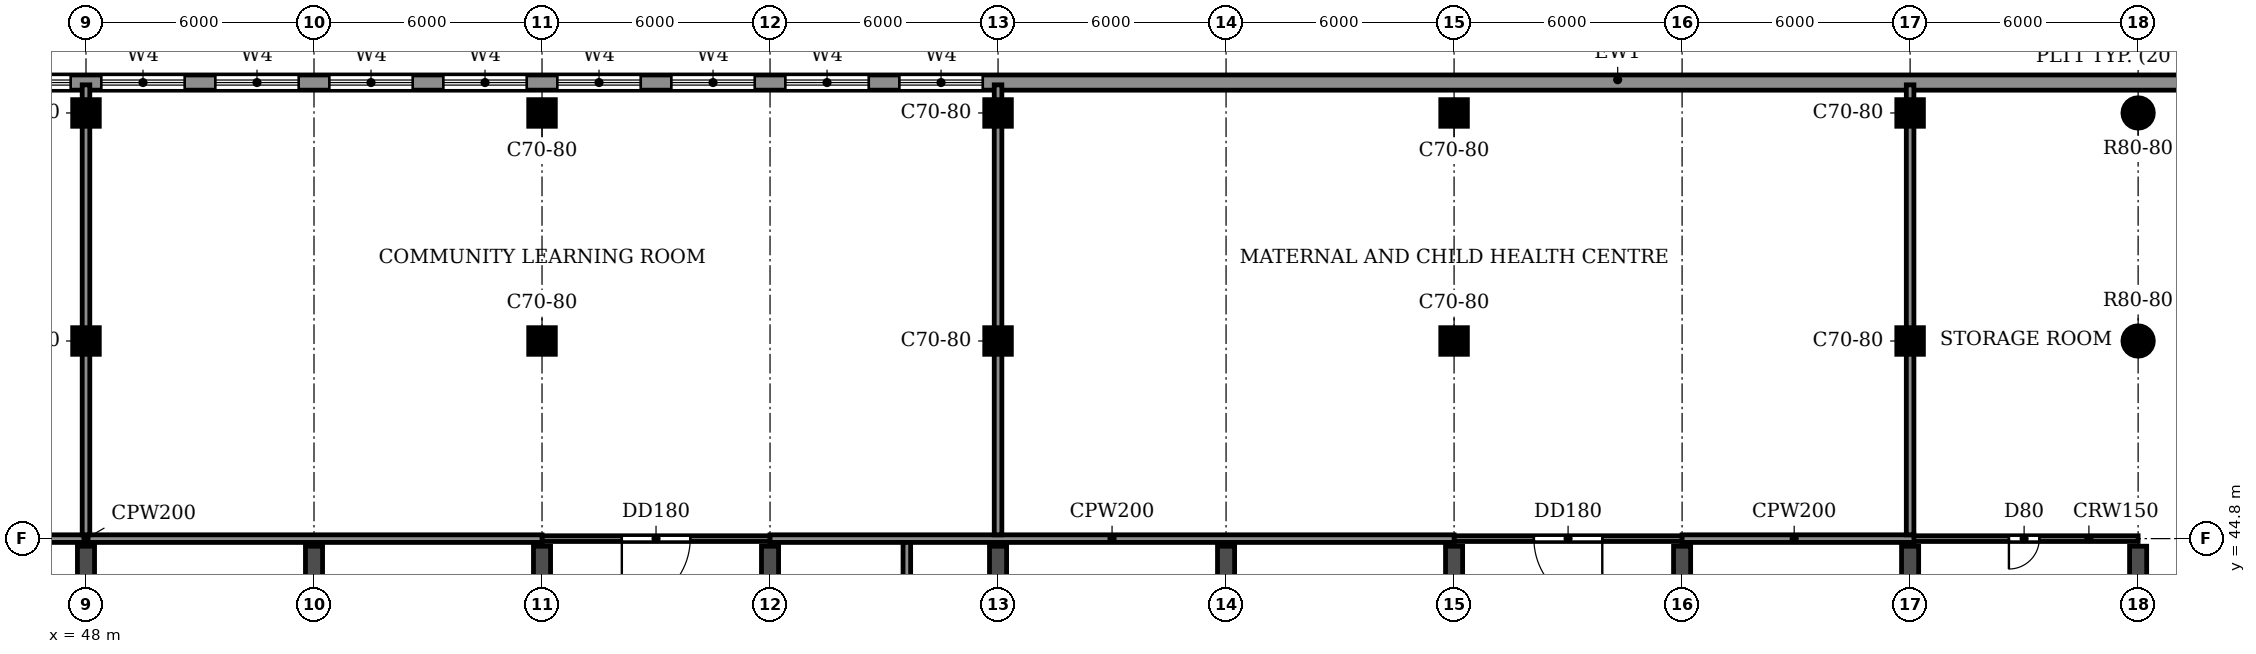
"""IFC4 building model, lengths in metres.
Left out: names, types, materials, properties, quantities, classifications, styles, units other than length and angle.
Written with IfcOpenShell. Run it as: python <this file> out.ifc"""

import sys

from ifc_helpers import new_model, si_unit, direction, frame, frame_2d, origin, origin_2d, place, context, subcontext, project, spatial, rectangle, circle, extrude, source, transform, mapped, element, fill, save


model = new_model("IFC4")
c1 = context("Model", 3, precision=1e-05, world=origin(), true_north=direction((0.0, 1.0)))
c2 = subcontext(c1, "Body", "Model", "MODEL_VIEW")
j1 = project(units=[si_unit("LENGTHUNIT", "METRE"), si_unit("PLANEANGLEUNIT", "RADIAN")], contexts=[c1])
p1 = place(None, origin())
s1 = spatial("IfcSite", under=j1, at=p1, CompositionType="ELEMENT")
p2 = place(p1, origin())
s2 = spatial("IfcBuilding", under=s1, at=p2, CompositionType="ELEMENT")
p3 = place(p2, frame((0.0, 0.0, 15.0)))
s3 = spatial("IfcBuildingStorey", under=s2, at=p3, CompositionType="ELEMENT", Elevation=15.0)
for number, where, z_axis, x_axis in (
    (1, (48.0, 30.55, 0.0), (0.0, 0.0, 1.0), (0.0, 1.0, 0.0)),
    (2, (54.0, 30.55, 0.0), (0.0, 0.0, 1.0), (0.0, 1.0, 0.0)),
    (3, (60.0, 30.55, 0.0), (0.0, 0.0, 1.0), (0.0, 1.0, 0.0)),
    (4, (66.0, 30.55, 0.0), (0.0, 0.0, 1.0), (0.0, 1.0, 0.0)),
    (5, (72.0, 30.55, 0.0), (0.0, 0.0, 1.0), (0.0, 1.0, 0.0)),
    (6, (78.0, 30.55, 0.0), (0.0, 0.0, 1.0), (0.0, 1.0, 0.0)),
    (7, (84.0, 30.55, 0.0), (0.0, 0.0, 1.0), (0.0, 1.0, 0.0)),
    (8, (90.0, 30.55, 0.0), (0.0, 0.0, 1.0), (0.0, 1.0, 0.0)),
    (9, (96.0, 30.55, 0.0), (0.0, 0.0, 1.0), (0.0, 1.0, 0.0)),
    (10, (102.0, 30.55, 0.0), (0.0, 0.0, 1.0), (0.0, 1.0, 0.0)),
):
    element("IfcWall", number, at=place(p3, frame(where, z_axis=z_axis, x_axis=x_axis)), inside=s3, PredefinedType="SHEAR", context=c2, shape_type="SweptSolid", body=[
        extrude(rectangle(XDim=14.05, YDim=0.45, at=frame_2d((7.025, 0.0))), origin(), (0.0, 0.0, 1.0), 3.92),
    ])
m1 = source(origin(), c2, "Body", "SweptSolid", [
    extrude(rectangle(XDim=0.7, YDim=0.7, at=origin_2d()), origin(), (0.0, 0.0, 1.0), 3.92),
])
for number, where, z_axis, x_axis in (
    (11, (48.0, 56.0, 0.0), (0.0, 0.0, 1.0), (1.0, 0.0, 0.0)),
    (12, (60.0, 56.0, 0.0), (0.0, 0.0, 1.0), (1.0, 0.0, 0.0)),
    (13, (72.0, 56.0, 0.0), (0.0, 0.0, 1.0), (1.0, 0.0, 0.0)),
    (14, (84.0, 56.0, 0.0), (0.0, 0.0, 1.0), (1.0, 0.0, 0.0)),
    (15, (96.0, 56.0, 0.0), (0.0, 0.0, 1.0), (1.0, 0.0, 0.0)),
):
    element("IfcColumn", number, at=place(p3, frame(where, z_axis=z_axis, x_axis=x_axis)), inside=s3, PredefinedType="COLUMN", context=c2, shape_type="MappedRepresentation", body=[
        mapped(m1, transform((0.0, 0.0, 0.0))),
    ])
m2 = source(origin(), c2, "Body", "SweptSolid", [
    extrude(circle(Radius=0.4, at=origin_2d()), origin(), (0.0, 0.0, 1.0), 3.92),
])
p4 = place(p3, frame((102.0, 56.0, 0.0), z_axis=(0.0, 0.0, 1.0), x_axis=(1.0, 0.0, 0.0)))
e16 = element("IfcColumn", 16, at=p4, inside=s3, PredefinedType="COLUMN", context=c2, shape_type="MappedRepresentation", body=[
    mapped(m2, transform((0.0, 0.0, 0.0))),
])
for number, where, z_axis, x_axis in (
    (17, (48.0, 50.0, 0.0), (0.0, 0.0, 1.0), (1.0, 0.0, 0.0)),
    (18, (60.0, 50.0, 0.0), (0.0, 0.0, 1.0), (1.0, 0.0, 0.0)),
    (19, (72.0, 50.0, 0.0), (0.0, 0.0, 1.0), (1.0, 0.0, 0.0)),
    (20, (84.0, 50.0, 0.0), (0.0, 0.0, 1.0), (1.0, 0.0, 0.0)),
    (21, (96.0, 50.0, 0.0), (0.0, 0.0, 1.0), (1.0, 0.0, 0.0)),
):
    element("IfcColumn", number, at=place(p3, frame(where, z_axis=z_axis, x_axis=x_axis)), inside=s3, PredefinedType="COLUMN", context=c2, shape_type="MappedRepresentation", body=[
        mapped(m1, transform((0.0, 0.0, 0.0))),
    ])
p5 = place(p3, frame((102.0, 50.0, 0.0), z_axis=(0.0, 0.0, 1.0), x_axis=(1.0, 0.0, 0.0)))
e22 = element("IfcColumn", 22, at=p5, inside=s3, PredefinedType="COLUMN", context=c2, shape_type="MappedRepresentation", body=[
    mapped(m2, transform((0.0, 0.0, 0.0))),
])
p6 = place(p3, frame((105.0, 56.8, 0.0), z_axis=(0.0, 0.0, 1.0), x_axis=(-1.0, 0.0, 0.0)))
e23 = element("IfcWall", 23, at=p6, inside=s3, PredefinedType="STANDARD", context=c2, shape_type="SweptSolid", body=[
    extrude(rectangle(XDim=108.0, YDim=0.4, at=frame_2d((54.0, 0.0))), origin(), (0.0, 0.0, 1.0), 3.92),
])
p7 = place(p6, frame((102.4, 0.0, 0.9)))
e24 = element("IfcOpeningElement", 24, at=p7, cuts=e23, PredefinedType="OPENING", context=c2, shape_type="SweptSolid", body=[
    extrude(rectangle(XDim=2.2, YDim=2.7, at=frame_2d((1.1, 1.35))), frame((0.0, 0.21, 0.0), z_axis=(0.0, -1.0, 0.0), x_axis=(1.0, 0.0, 0.0)), (0.0, 0.0, 1.0), 0.42),
])
p8 = place(p6, frame((99.4, 0.0, 0.9)))
e25 = element("IfcOpeningElement", 25, at=p8, cuts=e23, PredefinedType="OPENING", context=c2, shape_type="SweptSolid", body=[
    extrude(rectangle(XDim=2.2, YDim=2.7, at=frame_2d((1.1, 1.35))), frame((0.0, 0.21, 0.0), z_axis=(0.0, -1.0, 0.0), x_axis=(1.0, 0.0, 0.0)), (0.0, 0.0, 1.0), 0.42),
])
p9 = place(p6, frame((90.4, 0.0, 0.9)))
e26 = element("IfcOpeningElement", 26, at=p9, cuts=e23, PredefinedType="OPENING", context=c2, shape_type="SweptSolid", body=[
    extrude(rectangle(XDim=2.2, YDim=2.7, at=frame_2d((1.1, 1.35))), frame((0.0, 0.21, 0.0), z_axis=(0.0, -1.0, 0.0), x_axis=(1.0, 0.0, 0.0)), (0.0, 0.0, 1.0), 0.42),
])
p10 = place(p6, frame((87.4, 0.0, 0.9)))
e27 = element("IfcOpeningElement", 27, at=p10, cuts=e23, PredefinedType="OPENING", context=c2, shape_type="SweptSolid", body=[
    extrude(rectangle(XDim=2.2, YDim=2.7, at=frame_2d((1.1, 1.35))), frame((0.0, 0.21, 0.0), z_axis=(0.0, -1.0, 0.0), x_axis=(1.0, 0.0, 0.0)), (0.0, 0.0, 1.0), 0.42),
])
p11 = place(p6, frame((84.4, 0.0, 0.9)))
e28 = element("IfcOpeningElement", 28, at=p11, cuts=e23, PredefinedType="OPENING", context=c2, shape_type="SweptSolid", body=[
    extrude(rectangle(XDim=2.2, YDim=2.7, at=frame_2d((1.1, 1.35))), frame((0.0, 0.21, 0.0), z_axis=(0.0, -1.0, 0.0), x_axis=(1.0, 0.0, 0.0)), (0.0, 0.0, 1.0), 0.42),
])
p12 = place(p6, frame((81.4, 0.0, 0.9)))
e29 = element("IfcOpeningElement", 29, at=p12, cuts=e23, PredefinedType="OPENING", context=c2, shape_type="SweptSolid", body=[
    extrude(rectangle(XDim=2.2, YDim=2.7, at=frame_2d((1.1, 1.35))), frame((0.0, 0.21, 0.0), z_axis=(0.0, -1.0, 0.0), x_axis=(1.0, 0.0, 0.0)), (0.0, 0.0, 1.0), 0.42),
])
p13 = place(p6, frame((78.4, 0.0, 0.9)))
e30 = element("IfcOpeningElement", 30, at=p13, cuts=e23, PredefinedType="OPENING", context=c2, shape_type="SweptSolid", body=[
    extrude(rectangle(XDim=2.2, YDim=2.7, at=frame_2d((1.1, 1.35))), frame((0.0, 0.21, 0.0), z_axis=(0.0, -1.0, 0.0), x_axis=(1.0, 0.0, 0.0)), (0.0, 0.0, 1.0), 0.42),
])
p14 = place(p6, frame((75.4, 0.0, 0.9)))
e31 = element("IfcOpeningElement", 31, at=p14, cuts=e23, PredefinedType="OPENING", context=c2, shape_type="SweptSolid", body=[
    extrude(rectangle(XDim=2.2, YDim=2.7, at=frame_2d((1.1, 1.35))), frame((0.0, 0.21, 0.0), z_axis=(0.0, -1.0, 0.0), x_axis=(1.0, 0.0, 0.0)), (0.0, 0.0, 1.0), 0.42),
])
p15 = place(p6, frame((66.4, 0.0, 0.9)))
e32 = element("IfcOpeningElement", 32, at=p15, cuts=e23, PredefinedType="OPENING", context=c2, shape_type="SweptSolid", body=[
    extrude(rectangle(XDim=2.2, YDim=2.7, at=frame_2d((1.1, 1.35))), frame((0.0, 0.21, 0.0), z_axis=(0.0, -1.0, 0.0), x_axis=(1.0, 0.0, 0.0)), (0.0, 0.0, 1.0), 0.42),
])
p16 = place(p6, frame((63.4, 0.0, 0.9)))
e33 = element("IfcOpeningElement", 33, at=p16, cuts=e23, PredefinedType="OPENING", context=c2, shape_type="SweptSolid", body=[
    extrude(rectangle(XDim=2.2, YDim=2.7, at=frame_2d((1.1, 1.35))), frame((0.0, 0.21, 0.0), z_axis=(0.0, -1.0, 0.0), x_axis=(1.0, 0.0, 0.0)), (0.0, 0.0, 1.0), 0.42),
])
p17 = place(p6, frame((60.4, 0.0, 0.9)))
e34 = element("IfcOpeningElement", 34, at=p17, cuts=e23, PredefinedType="OPENING", context=c2, shape_type="SweptSolid", body=[
    extrude(rectangle(XDim=2.2, YDim=2.7, at=frame_2d((1.1, 1.35))), frame((0.0, 0.21, 0.0), z_axis=(0.0, -1.0, 0.0), x_axis=(1.0, 0.0, 0.0)), (0.0, 0.0, 1.0), 0.42),
])
p18 = place(p6, frame((57.4, 0.0, 0.9)))
e35 = element("IfcOpeningElement", 35, at=p18, cuts=e23, PredefinedType="OPENING", context=c2, shape_type="SweptSolid", body=[
    extrude(rectangle(XDim=2.2, YDim=2.7, at=frame_2d((1.1, 1.35))), frame((0.0, 0.21, 0.0), z_axis=(0.0, -1.0, 0.0), x_axis=(1.0, 0.0, 0.0)), (0.0, 0.0, 1.0), 0.42),
])
p19 = place(p6, frame((54.4, 0.0, 0.9)))
e36 = element("IfcOpeningElement", 36, at=p19, cuts=e23, PredefinedType="OPENING", context=c2, shape_type="SweptSolid", body=[
    extrude(rectangle(XDim=2.2, YDim=2.7, at=frame_2d((1.1, 1.35))), frame((0.0, 0.21, 0.0), z_axis=(0.0, -1.0, 0.0), x_axis=(1.0, 0.0, 0.0)), (0.0, 0.0, 1.0), 0.42),
])
p20 = place(p6, frame((51.4, 0.0, 0.9)))
e37 = element("IfcOpeningElement", 37, at=p20, cuts=e23, PredefinedType="OPENING", context=c2, shape_type="SweptSolid", body=[
    extrude(rectangle(XDim=2.2, YDim=2.7, at=frame_2d((1.1, 1.35))), frame((0.0, 0.21, 0.0), z_axis=(0.0, -1.0, 0.0), x_axis=(1.0, 0.0, 0.0)), (0.0, 0.0, 1.0), 0.42),
])
p21 = place(p6, frame((48.4, 0.0, 0.9)))
e38 = element("IfcOpeningElement", 38, at=p21, cuts=e23, PredefinedType="OPENING", context=c2, shape_type="SweptSolid", body=[
    extrude(rectangle(XDim=2.2, YDim=2.7, at=frame_2d((1.1, 1.35))), frame((0.0, 0.21, 0.0), z_axis=(0.0, -1.0, 0.0), x_axis=(1.0, 0.0, 0.0)), (0.0, 0.0, 1.0), 0.42),
])
p22 = place(p6, frame((45.4, 0.0, 0.9)))
e39 = element("IfcOpeningElement", 39, at=p22, cuts=e23, PredefinedType="OPENING", context=c2, shape_type="SweptSolid", body=[
    extrude(rectangle(XDim=2.2, YDim=2.7, at=frame_2d((1.1, 1.35))), frame((0.0, 0.21, 0.0), z_axis=(0.0, -1.0, 0.0), x_axis=(1.0, 0.0, 0.0)), (0.0, 0.0, 1.0), 0.42),
])
p23 = place(p6, frame((42.4, 0.0, 0.9)))
e40 = element("IfcOpeningElement", 40, at=p23, cuts=e23, PredefinedType="OPENING", context=c2, shape_type="SweptSolid", body=[
    extrude(rectangle(XDim=2.2, YDim=2.7, at=frame_2d((1.1, 1.35))), frame((0.0, 0.21, 0.0), z_axis=(0.0, -1.0, 0.0), x_axis=(1.0, 0.0, 0.0)), (0.0, 0.0, 1.0), 0.42),
])
p24 = place(p6, frame((39.4, 0.0, 0.9)))
e41 = element("IfcOpeningElement", 41, at=p24, cuts=e23, PredefinedType="OPENING", context=c2, shape_type="SweptSolid", body=[
    extrude(rectangle(XDim=2.2, YDim=2.7, at=frame_2d((1.1, 1.35))), frame((0.0, 0.21, 0.0), z_axis=(0.0, -1.0, 0.0), x_axis=(1.0, 0.0, 0.0)), (0.0, 0.0, 1.0), 0.42),
])
p25 = place(p6, frame((36.4, 0.0, 0.9)))
e42 = element("IfcOpeningElement", 42, at=p25, cuts=e23, PredefinedType="OPENING", context=c2, shape_type="SweptSolid", body=[
    extrude(rectangle(XDim=2.2, YDim=2.7, at=frame_2d((1.1, 1.35))), frame((0.0, 0.21, 0.0), z_axis=(0.0, -1.0, 0.0), x_axis=(1.0, 0.0, 0.0)), (0.0, 0.0, 1.0), 0.42),
])
p26 = place(p6, frame((33.4, 0.0, 0.9)))
e43 = element("IfcOpeningElement", 43, at=p26, cuts=e23, PredefinedType="OPENING", context=c2, shape_type="SweptSolid", body=[
    extrude(rectangle(XDim=2.2, YDim=2.7, at=frame_2d((1.1, 1.35))), frame((0.0, 0.21, 0.0), z_axis=(0.0, -1.0, 0.0), x_axis=(1.0, 0.0, 0.0)), (0.0, 0.0, 1.0), 0.42),
])
p27 = place(p6, frame((93.65, 0.0, 0.0)))
e44 = element("IfcOpeningElement", 44, at=p27, cuts=e23, PredefinedType="OPENING", context=c2, shape_type="SweptSolid", body=[
    extrude(rectangle(XDim=2.0, YDim=2.4, at=frame_2d((1.0, 1.2))), frame((0.0, 0.21, 0.0), z_axis=(0.0, -1.0, 0.0), x_axis=(1.0, 0.0, 0.0)), (0.0, 0.0, 1.0), 0.42),
])
p28 = place(p6, frame((69.8, 0.0, 0.0)))
e45 = element("IfcOpeningElement", 45, at=p28, cuts=e23, PredefinedType="OPENING", context=c2, shape_type="SweptSolid", body=[
    extrude(rectangle(XDim=2.0, YDim=2.4, at=frame_2d((1.0, 1.2))), frame((0.0, 0.21, 0.0), z_axis=(0.0, -1.0, 0.0), x_axis=(1.0, 0.0, 0.0)), (0.0, 0.0, 1.0), 0.42),
])
p29 = place(p3, frame((60.0, 44.8, 0.0), z_axis=(0.0, 0.0, 1.0), x_axis=(1.0, 0.0, 0.0)))
e46 = element("IfcWall", 46, at=p29, inside=s3, PredefinedType="PARTITIONING", context=c2, shape_type="SweptSolid", body=[
    extrude(rectangle(XDim=6.0, YDim=0.15, at=frame_2d((3.0, 0.0))), origin(), (0.0, 0.0, 1.0), 3.92),
])
p30 = place(p29, frame((2.1, 0.0, 0.0)))
e47 = element("IfcOpeningElement", 47, at=p30, cuts=e46, PredefinedType="OPENING", context=c2, shape_type="SweptSolid", body=[
    extrude(rectangle(XDim=1.8, YDim=2.1, at=frame_2d((0.9, 1.05))), frame((0.0, 0.085, 0.0), z_axis=(0.0, -1.0, 0.0), x_axis=(1.0, 0.0, 0.0)), (0.0, 0.0, 1.0), 0.17),
])
p31 = place(p3, frame((84.0, 44.8, 0.0), z_axis=(0.0, 0.0, 1.0), x_axis=(1.0, 0.0, 0.0)))
e48 = element("IfcWall", 48, at=p31, inside=s3, PredefinedType="PARTITIONING", context=c2, shape_type="SweptSolid", body=[
    extrude(rectangle(XDim=6.0, YDim=0.15, at=frame_2d((3.0, 0.0))), origin(), (0.0, 0.0, 1.0), 3.92),
])
p32 = place(p31, frame((2.1, 0.0, 0.0)))
e49 = element("IfcOpeningElement", 49, at=p32, cuts=e48, PredefinedType="OPENING", context=c2, shape_type="SweptSolid", body=[
    extrude(rectangle(XDim=1.8, YDim=2.1, at=frame_2d((0.9, 1.05))), frame((0.0, 0.085, 0.0), z_axis=(0.0, -1.0, 0.0), x_axis=(1.0, 0.0, 0.0)), (0.0, 0.0, 1.0), 0.17),
])
p33 = place(p3, frame((95.9, 44.8, 0.0), z_axis=(0.0, 0.0, 1.0), x_axis=(1.0, 0.0, 0.0)))
e50 = element("IfcWall", 50, at=p33, inside=s3, PredefinedType="PARTITIONING", context=c2, shape_type="SweptSolid", body=[
    extrude(rectangle(XDim=6.1, YDim=0.15, at=frame_2d((3.05, 0.0))), origin(), (0.0, 0.0, 1.0), 3.92),
])
p34 = place(p33, frame((2.7, 0.0, 0.0)))
e51 = element("IfcOpeningElement", 51, at=p34, cuts=e50, PredefinedType="OPENING", context=c2, shape_type="SweptSolid", body=[
    extrude(rectangle(XDim=0.8, YDim=2.1, at=frame_2d((0.4, 1.05))), frame((0.0, 0.085, 0.0), z_axis=(0.0, -1.0, 0.0), x_axis=(1.0, 0.0, 0.0)), (0.0, 0.0, 1.0), 0.17),
])
p35 = place(p3, frame((36.0, 44.8, 0.0), z_axis=(0.0, 0.0, 1.0), x_axis=(1.0, 0.0, 0.0)))
e52 = element("IfcWall", 52, at=p35, inside=s3, PredefinedType="PARTITIONING", context=c2, shape_type="SweptSolid", body=[
    extrude(rectangle(XDim=24.0, YDim=0.2, at=frame_2d((12.0, 0.0))), origin(), (0.0, 0.0, 1.0), 3.92),
])
p36 = place(p3, frame((66.0, 44.8, 0.0), z_axis=(0.0, 0.0, 1.0), x_axis=(1.0, 0.0, 0.0)))
e53 = element("IfcWall", 53, at=p36, inside=s3, PredefinedType="PARTITIONING", context=c2, shape_type="SweptSolid", body=[
    extrude(rectangle(XDim=18.0, YDim=0.2, at=frame_2d((9.0, 0.0))), origin(), (0.0, 0.0, 1.0), 3.92),
])
p37 = place(p3, frame((90.0, 44.8, 0.0), z_axis=(0.0, 0.0, 1.0), x_axis=(1.0, 0.0, 0.0)))
e54 = element("IfcWall", 54, at=p37, inside=s3, PredefinedType="PARTITIONING", context=c2, shape_type="SweptSolid", body=[
    extrude(rectangle(XDim=6.1, YDim=0.2, at=frame_2d((3.05, 0.0))), origin(), (0.0, 0.0, 1.0), 3.92),
])
p38 = place(p3, frame((48.0, 44.9, 0.0), z_axis=(0.0, 0.0, 1.0), x_axis=(0.0, 1.0, 0.0)))
e55 = element("IfcWall", 55, at=p38, inside=s3, PredefinedType="PARTITIONING", context=c2, shape_type="SweptSolid", body=[
    extrude(rectangle(XDim=11.84, YDim=0.2, at=frame_2d((5.92, 0.0))), origin(), (0.0, 0.0, 1.0), 3.92),
])
p39 = place(p3, frame((69.6, 32.875, 0.0), z_axis=(0.0, 0.0, 1.0), x_axis=(0.0, 1.0, 0.0)))
e56 = element("IfcWall", 56, at=p39, inside=s3, PredefinedType="PARTITIONING", context=c2, shape_type="SweptSolid", body=[
    extrude(rectangle(XDim=11.825, YDim=0.2, at=frame_2d((5.913, 0.0))), origin(), (0.0, 0.0, 1.0), 3.92),
])
for number, where, z_axis, x_axis in (
    (57, (72.0, 44.9, 0.0), (0.0, 0.0, 1.0), (0.0, 1.0, 0.0)),
    (58, (96.0, 44.9, 0.0), (0.0, 0.0, 1.0), (0.0, 1.0, 0.0)),
):
    element("IfcWall", number, at=place(p3, frame(where, z_axis=z_axis, x_axis=x_axis)), inside=s3, PredefinedType="PARTITIONING", context=c2, shape_type="SweptSolid", body=[
        extrude(rectangle(XDim=11.84, YDim=0.2, at=frame_2d((5.92, 0.0))), origin(), (0.0, 0.0, 1.0), 3.92),
    ])
p40 = place(p18, origin())
e59 = element("IfcWindow", 59, at=p40, inside=s3, PartitioningType="DOUBLE_PANEL_HORIZONTAL", PredefinedType="WINDOW", context=c2, shape_type="SweptSolid", body=[
    extrude(rectangle(XDim=2.2, YDim=2.7, at=frame_2d((1.1, 1.35))), frame((0.0, 0.03, 0.0), z_axis=(0.0, -1.0, 0.0), x_axis=(1.0, 0.0, 0.0)), (0.0, 0.0, 1.0), 0.06),
])
fill(e35, e59)
p41 = place(p19, origin())
e60 = element("IfcWindow", 60, at=p41, inside=s3, PartitioningType="DOUBLE_PANEL_HORIZONTAL", PredefinedType="WINDOW", context=c2, shape_type="SweptSolid", body=[
    extrude(rectangle(XDim=2.2, YDim=2.7, at=frame_2d((1.1, 1.35))), frame((0.0, 0.03, 0.0), z_axis=(0.0, -1.0, 0.0), x_axis=(1.0, 0.0, 0.0)), (0.0, 0.0, 1.0), 0.06),
])
fill(e36, e60)
p42 = place(p20, origin())
e61 = element("IfcWindow", 61, at=p42, inside=s3, PartitioningType="DOUBLE_PANEL_HORIZONTAL", PredefinedType="WINDOW", context=c2, shape_type="SweptSolid", body=[
    extrude(rectangle(XDim=2.2, YDim=2.7, at=frame_2d((1.1, 1.35))), frame((0.0, 0.03, 0.0), z_axis=(0.0, -1.0, 0.0), x_axis=(1.0, 0.0, 0.0)), (0.0, 0.0, 1.0), 0.06),
])
fill(e37, e61)
p43 = place(p21, origin())
e62 = element("IfcWindow", 62, at=p43, inside=s3, PartitioningType="DOUBLE_PANEL_HORIZONTAL", PredefinedType="WINDOW", context=c2, shape_type="SweptSolid", body=[
    extrude(rectangle(XDim=2.2, YDim=2.7, at=frame_2d((1.1, 1.35))), frame((0.0, 0.03, 0.0), z_axis=(0.0, -1.0, 0.0), x_axis=(1.0, 0.0, 0.0)), (0.0, 0.0, 1.0), 0.06),
])
fill(e38, e62)
p44 = place(p22, origin())
e63 = element("IfcWindow", 63, at=p44, inside=s3, PartitioningType="DOUBLE_PANEL_HORIZONTAL", PredefinedType="WINDOW", context=c2, shape_type="SweptSolid", body=[
    extrude(rectangle(XDim=2.2, YDim=2.7, at=frame_2d((1.1, 1.35))), frame((0.0, 0.03, 0.0), z_axis=(0.0, -1.0, 0.0), x_axis=(1.0, 0.0, 0.0)), (0.0, 0.0, 1.0), 0.06),
])
fill(e39, e63)
p45 = place(p23, origin())
e64 = element("IfcWindow", 64, at=p45, inside=s3, PartitioningType="DOUBLE_PANEL_HORIZONTAL", PredefinedType="WINDOW", context=c2, shape_type="SweptSolid", body=[
    extrude(rectangle(XDim=2.2, YDim=2.7, at=frame_2d((1.1, 1.35))), frame((0.0, 0.03, 0.0), z_axis=(0.0, -1.0, 0.0), x_axis=(1.0, 0.0, 0.0)), (0.0, 0.0, 1.0), 0.06),
])
fill(e40, e64)
p46 = place(p24, origin())
e65 = element("IfcWindow", 65, at=p46, inside=s3, PartitioningType="DOUBLE_PANEL_HORIZONTAL", PredefinedType="WINDOW", context=c2, shape_type="SweptSolid", body=[
    extrude(rectangle(XDim=2.2, YDim=2.7, at=frame_2d((1.1, 1.35))), frame((0.0, 0.03, 0.0), z_axis=(0.0, -1.0, 0.0), x_axis=(1.0, 0.0, 0.0)), (0.0, 0.0, 1.0), 0.06),
])
fill(e41, e65)
p47 = place(p25, origin())
e66 = element("IfcWindow", 66, at=p47, inside=s3, PartitioningType="DOUBLE_PANEL_HORIZONTAL", PredefinedType="WINDOW", context=c2, shape_type="SweptSolid", body=[
    extrude(rectangle(XDim=2.2, YDim=2.7, at=frame_2d((1.1, 1.35))), frame((0.0, 0.03, 0.0), z_axis=(0.0, -1.0, 0.0), x_axis=(1.0, 0.0, 0.0)), (0.0, 0.0, 1.0), 0.06),
])
fill(e42, e66)
p48 = place(p26, origin())
e67 = element("IfcWindow", 67, at=p48, inside=s3, PartitioningType="DOUBLE_PANEL_HORIZONTAL", PredefinedType="WINDOW", context=c2, shape_type="SweptSolid", body=[
    extrude(rectangle(XDim=2.2, YDim=2.7, at=frame_2d((1.1, 1.35))), frame((0.0, 0.03, 0.0), z_axis=(0.0, -1.0, 0.0), x_axis=(1.0, 0.0, 0.0)), (0.0, 0.0, 1.0), 0.06),
])
fill(e43, e67)
p49 = place(p30, frame((1.8, 0.0, 0.0), z_axis=(0.0, 0.0, 1.0), x_axis=(-1.0, 0.0, 0.0)))
e68 = element("IfcDoor", 68, at=p49, inside=s3, OperationType="DOUBLE_DOOR_SINGLE_SWING", PredefinedType="DOOR", context=c2, shape_type="SweptSolid", body=[
    extrude(rectangle(XDim=1.8, YDim=2.1, at=frame_2d((0.9, 1.05))), frame((0.0, 0.025, 0.0), z_axis=(0.0, -1.0, 0.0), x_axis=(1.0, 0.0, 0.0)), (0.0, 0.0, 1.0), 0.05),
])
fill(e47, e68)
p50 = place(p32, frame((1.8, 0.0, 0.0), z_axis=(0.0, 0.0, 1.0), x_axis=(-1.0, 0.0, 0.0)))
e69 = element("IfcDoor", 69, at=p50, inside=s3, OperationType="DOUBLE_DOOR_SINGLE_SWING", PredefinedType="DOOR", context=c2, shape_type="SweptSolid", body=[
    extrude(rectangle(XDim=1.8, YDim=2.1, at=frame_2d((0.9, 1.05))), frame((0.0, 0.025, 0.0), z_axis=(0.0, -1.0, 0.0), x_axis=(1.0, 0.0, 0.0)), (0.0, 0.0, 1.0), 0.05),
])
fill(e49, e69)
p51 = place(p34, frame((0.8, 0.0, 0.0), z_axis=(0.0, 0.0, 1.0), x_axis=(-1.0, 0.0, 0.0)))
e70 = element("IfcDoor", 70, at=p51, inside=s3, OperationType="SINGLE_SWING_RIGHT", PredefinedType="DOOR", context=c2, shape_type="SweptSolid", body=[
    extrude(rectangle(XDim=0.8, YDim=2.1, at=frame_2d((0.4, 1.05))), frame((0.0, 0.025, 0.0), z_axis=(0.0, -1.0, 0.0), x_axis=(1.0, 0.0, 0.0)), (0.0, 0.0, 1.0), 0.05),
])
fill(e51, e70)
save(model, sys.argv[1])
